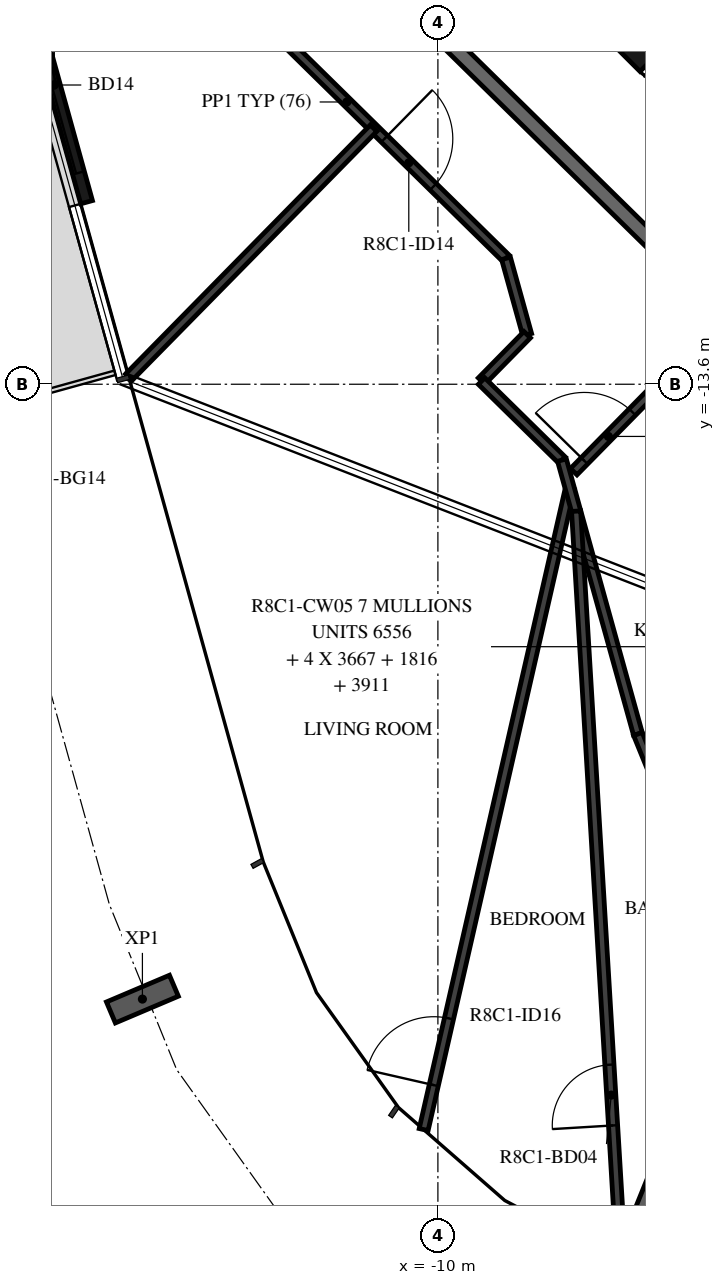
"""IFC4 building model, lengths in metres.
Left out: names, types, materials, properties, quantities, classifications, styles, units other than length and angle.
Written with IfcOpenShell. Run it as: python <this file> out.ifc"""

import sys

from ifc_helpers import new_model, si_unit, direction, frame, frame_2d, origin, origin_2d, place, context, subcontext, project, spatial, rectangle, i_section, extrude, element, fill, save


model = new_model("IFC4")
c1 = context("Model", 3, precision=1e-05, world=origin(), true_north=direction((0.0, 1.0)))
c2 = subcontext(c1, "Body", "Model", "MODEL_VIEW")
j1 = project(units=[si_unit("LENGTHUNIT", "METRE"), si_unit("PLANEANGLEUNIT", "RADIAN")], contexts=[c1])
p1 = place(None, origin())
s1 = spatial("IfcSite", under=j1, at=p1, CompositionType="ELEMENT")
p2 = place(p1, origin())
s2 = spatial("IfcBuilding", under=s1, at=p2, CompositionType="ELEMENT")
p3 = place(p2, frame((0.0, 0.0, 322.7)))
s3 = spatial("IfcBuildingStorey", under=s2, at=p3, CompositionType="ELEMENT", Elevation=322.7)
p4 = place(p3, frame((-13.887, -21.689, -0.38), z_axis=(0.0, 0.0, 1.0), x_axis=(-0.390457907184, 0.920620781167, 0.0)))
e1 = element("IfcColumn", 1, at=p4, inside=s3, PredefinedType="COLUMN", context=c2, shape_type="SweptSolid", body=[
    extrude(i_section(OverallWidth=0.3, OverallDepth=0.9, WebThickness=0.019, FlangeThickness=0.035, FilletRadius=0.03, at=origin_2d()), origin(), (0.0, 0.0, 1.0), 2.616),
])
p5 = place(p3, frame((-15.477, -8.122, 0.0), z_axis=(0.0, 0.0, 1.0), x_axis=(0.267195229387, -0.963642417805, 0.0)))
e2 = element("IfcWall", 2, at=p5, inside=s3, PredefinedType="STANDARD", context=c2, shape_type="SweptSolid", body=[
    extrude(rectangle(XDim=3.2, YDim=0.16, at=frame_2d((1.6, 0.0))), origin(), (0.0, 0.0, 1.0), 3.05),
])
p6 = place(p5, frame((0.4, 0.0, 0.0)))
e3 = element("IfcOpeningElement", 3, at=p6, cuts=e2, PredefinedType="OPENING", context=c2, shape_type="SweptSolid", body=[
    extrude(rectangle(XDim=2.4, YDim=2.4, at=frame_2d((1.2, 1.2))), frame((0.0, 0.09, 0.0), z_axis=(0.0, -1.0, 0.0), x_axis=(1.0, 0.0, 0.0)), (0.0, 0.0, 1.0), 0.18),
])
p7 = place(p3, frame((-9.308, -7.164, 0.0), z_axis=(0.0, 0.0, 1.0), x_axis=(0.707106781187, -0.707106781187, 0.0)))
e4 = element("IfcWall", 4, at=p7, inside=s3, PredefinedType="SHEAR", context=c2, shape_type="SweptSolid", body=[
    extrude(rectangle(XDim=3.032, YDim=0.5, at=frame_2d((1.516, 0.0))), origin(), (0.0, 0.0, 1.0), 3.05),
])
p8 = place(p3, frame((-11.953, -7.041, 0.0), z_axis=(0.0, 0.0, 1.0), x_axis=(0.713250549143, -0.70090916255, 0.0)))
e5 = element("IfcWall", 5, at=p8, inside=s3, PredefinedType="STANDARD", context=c2, shape_type="SweptSolid", body=[
    extrude(rectangle(XDim=7.181, YDim=0.2, at=frame_2d((3.59, 0.0))), origin(), (0.0, 0.0, 1.0), 3.05),
])
p9 = place(p3, frame((-7.582, -25.151, 0.0), z_axis=(0.0, 0.0, 1.0), x_axis=(0.374645287615, 0.927168220156, 0.0)))
e6 = element("IfcWall", 6, at=p9, inside=s3, PredefinedType="STANDARD", context=c2, shape_type="SweptSolid", body=[
    extrude(rectangle(XDim=6.423, YDim=0.2, at=frame_2d((3.212, 0.0))), origin(), (0.0, 0.0, 1.0), 3.05),
])
p10 = place(p3, frame((-13.291, -7.829, 0.0), z_axis=(0.0, 0.0, 1.0), x_axis=(0.713255094589, -0.700904537039, 0.0)))
e7 = element("IfcWall", 7, at=p10, inside=s3, PredefinedType="PARTITIONING", context=c2, shape_type="SweptSolid", body=[
    extrude(rectangle(XDim=5.871, YDim=0.12, at=frame_2d((2.936, 0.0))), origin(), (0.0, 0.0, 1.0), 3.05),
])
p11 = place(p10, frame((3.627, 0.0, 0.0)))
e8 = element("IfcOpeningElement", 8, at=p11, cuts=e7, PredefinedType="OPENING", context=c2, shape_type="SweptSolid", body=[
    extrude(rectangle(XDim=0.9, YDim=2.1, at=frame_2d((0.45, 1.05))), frame((0.0, 0.07, 0.0), z_axis=(0.0, -1.0, 0.0), x_axis=(1.0, 0.0, 0.0)), (0.0, 0.0, 1.0), 0.14),
])
p12 = place(p3, frame((-9.104, -11.944, 0.0), z_axis=(0.0, 0.0, 1.0), x_axis=(0.267317596771, -0.963608479859, 0.0)))
e9 = element("IfcWall", 9, at=p12, inside=s3, PredefinedType="PARTITIONING", context=c2, shape_type="SweptSolid", body=[
    extrude(rectangle(XDim=1.042, YDim=0.12, at=frame_2d((0.521, 0.0))), origin(), (0.0, 0.0, 1.0), 3.05),
])
p13 = place(p3, frame((-8.825, -12.948, 0.0), z_axis=(0.0, 0.0, 1.0), x_axis=(-0.700949034431, -0.713211364976, 0.0)))
e10 = element("IfcWall", 10, at=p13, inside=s3, PredefinedType="PARTITIONING", context=c2, shape_type="SweptSolid", body=[
    extrude(rectangle(XDim=0.856, YDim=0.12, at=frame_2d((0.428, 0.0))), origin(), (0.0, 0.0, 1.0), 3.05),
])
p14 = place(p3, frame((-9.425, -13.559, 0.0), z_axis=(0.0, 0.0, 1.0), x_axis=(0.713255540994, -0.700904082768, 0.0)))
e11 = element("IfcWall", 11, at=p14, inside=s3, PredefinedType="PARTITIONING", context=c2, shape_type="SweptSolid", body=[
    extrude(rectangle(XDim=1.482, YDim=0.12, at=frame_2d((0.741, 0.0))), origin(), (0.0, 0.0, 1.0), 3.05),
])
p15 = place(p3, frame((-8.213, -14.75, 0.0), z_axis=(0.0, 0.0, 1.0), x_axis=(0.700899260151, 0.713260280066, 0.0)))
e12 = element("IfcWall", 12, at=p15, inside=s3, PredefinedType="PARTITIONING", context=c2, shape_type="SweptSolid", body=[
    extrude(rectangle(XDim=1.659, YDim=0.12, at=frame_2d((0.83, 0.0))), origin(), (0.0, 0.0, 1.0), 3.05),
])
p16 = place(p15, frame((0.2, 0.0, 0.0)))
e13 = element("IfcOpeningElement", 13, at=p16, cuts=e12, PredefinedType="OPENING", context=c2, shape_type="SweptSolid", body=[
    extrude(rectangle(XDim=0.9, YDim=2.1, at=frame_2d((0.45, 1.05))), frame((0.0, 0.07, 0.0), z_axis=(0.0, -1.0, 0.0), x_axis=(1.0, 0.0, 0.0)), (0.0, 0.0, 1.0), 0.14),
])
p17 = place(p3, frame((-14.066, -13.508, 0.0), z_axis=(0.0, 0.0, 1.0), x_axis=(0.700941781432, 0.7132184932, 0.0)))
e14 = element("IfcWall", 14, at=p17, inside=s3, PredefinedType="PARTITIONING", context=c2, shape_type="SweptSolid", body=[
    extrude(rectangle(XDim=4.594, YDim=0.12, at=frame_2d((2.297, 0.0))), origin(), (0.0, 0.0, 1.0), 3.05),
])
p18 = place(p3, frame((-10.187, -23.406, 0.0), z_axis=(0.0, 0.0, 1.0), x_axis=(0.222411648081, 0.974952849526, 0.0)))
e15 = element("IfcWall", 15, at=p18, inside=s3, PredefinedType="PARTITIONING", context=c2, shape_type="SweptSolid", body=[
    extrude(rectangle(XDim=8.649, YDim=0.12, at=frame_2d((4.324, 0.0))), origin(), (0.0, 0.0, 1.0), 3.05),
])
p19 = place(p18, frame((0.6, 0.0, 0.0)))
e16 = element("IfcOpeningElement", 16, at=p19, cuts=e15, PredefinedType="OPENING", context=c2, shape_type="SweptSolid", body=[
    extrude(rectangle(XDim=0.9, YDim=2.1, at=frame_2d((0.45, 1.05))), frame((0.0, 0.07, 0.0), z_axis=(0.0, -1.0, 0.0), x_axis=(1.0, 0.0, 0.0)), (0.0, 0.0, 1.0), 0.14),
])
p20 = place(p3, frame((-7.368, -18.202, 0.0), z_axis=(0.0, 0.0, 1.0), x_axis=(-0.267246564077, 0.963628182438, 0.0)))
e17 = element("IfcWall", 17, at=p20, inside=s3, PredefinedType="PARTITIONING", context=c2, shape_type="SweptSolid", body=[
    extrude(rectangle(XDim=3.74, YDim=0.12, at=frame_2d((1.87, 0.0))), origin(), (0.0, 0.0, 1.0), 3.05),
])
p21 = place(p3, frame((-7.587, -25.148, 0.0), z_axis=(0.0, 0.0, 1.0), x_axis=(-0.060023558623, 0.99819696073, 0.0)))
e18 = element("IfcWall", 18, at=p21, inside=s3, PredefinedType="PARTITIONING", context=c2, shape_type="SweptSolid", body=[
    extrude(rectangle(XDim=9.896, YDim=0.12, at=frame_2d((4.948, 0.0))), origin(), (0.0, 0.0, 1.0), 3.05),
])
p22 = place(p21, frame((1.8, 0.0, 0.0)))
e19 = element("IfcOpeningElement", 19, at=p22, cuts=e18, PredefinedType="OPENING", context=c2, shape_type="SweptSolid", body=[
    extrude(rectangle(XDim=0.8, YDim=2.1, at=frame_2d((0.4, 1.05))), frame((0.0, 0.07, 0.0), z_axis=(0.0, -1.0, 0.0), x_axis=(1.0, 0.0, 0.0)), (0.0, 0.0, 1.0), 0.14),
])
p23 = place(p3, frame((-7.368, -18.202, 0.0), z_axis=(0.0, 0.0, 1.0), x_axis=(0.377296887314, -0.92609235977, 0.0)))
e20 = element("IfcWall", 20, at=p23, inside=s3, PredefinedType="PARTITIONING", context=c2, shape_type="SweptSolid", body=[
    extrude(rectangle(XDim=0.947, YDim=0.12, at=frame_2d((0.473, 0.0))), origin(), (0.0, 0.0, 1.0), 3.05),
])
p24 = place(p6, origin())
e21 = element("IfcDoor", 21, at=p24, inside=s3, OperationType="DOUBLE_DOOR_SLIDING", PredefinedType="DOOR", context=c2, shape_type="SweptSolid", body=[
    extrude(rectangle(XDim=2.4, YDim=2.4, at=frame_2d((1.2, 1.2))), frame((0.0, 0.025, 0.0), z_axis=(0.0, -1.0, 0.0), x_axis=(1.0, 0.0, 0.0)), (0.0, 0.0, 1.0), 0.05),
])
fill(e3, e21)
p25 = place(p11, origin())
e22 = element("IfcDoor", 22, at=p25, inside=s3, OperationType="SINGLE_SWING_RIGHT", PredefinedType="DOOR", context=c2, shape_type="SweptSolid", body=[
    extrude(rectangle(XDim=0.9, YDim=2.1, at=frame_2d((0.45, 1.05))), frame((0.0, 0.025, 0.0), z_axis=(0.0, -1.0, 0.0), x_axis=(1.0, 0.0, 0.0)), (0.0, 0.0, 1.0), 0.05),
])
fill(e8, e22)
p26 = place(p16, origin())
e23 = element("IfcDoor", 23, at=p26, inside=s3, OperationType="SINGLE_SWING_LEFT", PredefinedType="DOOR", context=c2, shape_type="SweptSolid", body=[
    extrude(rectangle(XDim=0.9, YDim=2.1, at=frame_2d((0.45, 1.05))), frame((0.0, 0.025, 0.0), z_axis=(0.0, -1.0, 0.0), x_axis=(1.0, 0.0, 0.0)), (0.0, 0.0, 1.0), 0.05),
])
fill(e13, e23)
p27 = place(p19, origin())
e24 = element("IfcDoor", 24, at=p27, inside=s3, OperationType="SINGLE_SWING_RIGHT", PredefinedType="DOOR", context=c2, shape_type="SweptSolid", body=[
    extrude(rectangle(XDim=0.9, YDim=2.1, at=frame_2d((0.45, 1.05))), frame((0.0, 0.025, 0.0), z_axis=(0.0, -1.0, 0.0), x_axis=(1.0, 0.0, 0.0)), (0.0, 0.0, 1.0), 0.05),
])
fill(e16, e24)
p28 = place(p22, origin())
e25 = element("IfcDoor", 25, at=p28, inside=s3, OperationType="SINGLE_SWING_RIGHT", PredefinedType="DOOR", context=c2, shape_type="SweptSolid", body=[
    extrude(rectangle(XDim=0.8, YDim=2.1, at=frame_2d((0.4, 1.05))), frame((0.0, 0.025, 0.0), z_axis=(0.0, -1.0, 0.0), x_axis=(1.0, 0.0, 0.0)), (0.0, 0.0, 1.0), 0.05),
])
fill(e19, e25)
save(model, sys.argv[1])
